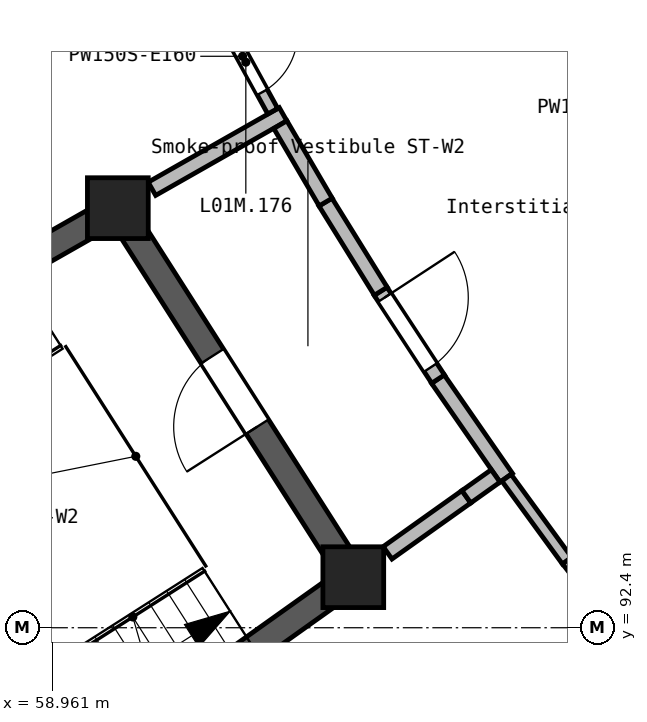
"""IFC4 building model, lengths in metres.
Left out: names, types, materials, properties, quantities, classifications, styles, units other than length and angle.
Written with IfcOpenShell. Run it as: python <this file> out.ifc"""

import sys

from ifc_helpers import new_model, si_unit, direction, frame, frame_2d, origin, origin_2d, place, context, subcontext, project, spatial, rectangle, extrude, element, fill, save


model = new_model("IFC4")
c1 = context("Model", 3, precision=1e-05, world=origin(), true_north=direction((0.0, 1.0)))
c2 = subcontext(c1, "Body", "Model", "MODEL_VIEW")
j1 = project(units=[si_unit("LENGTHUNIT", "METRE"), si_unit("PLANEANGLEUNIT", "RADIAN")], contexts=[c1])
p1 = place(None, origin())
s1 = spatial("IfcSite", under=j1, at=p1, CompositionType="ELEMENT")
p2 = place(p1, origin())
s2 = spatial("IfcBuilding", under=s1, at=p2, CompositionType="ELEMENT")
p3 = place(p2, frame((0.0, 0.0, 9.9)))
s3 = spatial("IfcBuildingStorey", under=s2, at=p3, CompositionType="ELEMENT", Elevation=9.9)
for number, where, z_axis, x_axis in (
    (1, (59.826, 97.92, 0.0), (0.0, 0.0, 1.0), (1.0, 0.0, 0.0)),
    (2, (62.924, 93.065, 0.0), (0.0, 0.0, 1.0), (1.0, 0.0, 0.0)),
):
    element("IfcColumn", number, at=place(p3, frame(where, z_axis=z_axis, x_axis=x_axis)), inside=s3, PredefinedType="COLUMN", context=c2, shape_type="SweptSolid", body=[
        extrude(rectangle(XDim=0.8, YDim=0.8, at=origin_2d()), origin(), (0.0, 0.0, 1.0), 2.7),
    ])
p4 = place(p3, frame((53.416, 94.274, 0.0), z_axis=(0.0, 0.0, 1.0), x_axis=(0.869250335475, 0.494372181941, 0.0)))
e3 = element("IfcWall", 3, at=p4, inside=s3, PredefinedType="SHEAR", context=c2, shape_type="SweptSolid", body=[
    extrude(rectangle(XDim=7.549, YDim=0.35, at=frame_2d((3.775, 0.0))), origin(), (0.0, 0.0, 1.0), 2.7),
])
p5 = place(p3, frame((56.916, 88.789, 0.0), z_axis=(0.0, 0.0, 1.0), x_axis=(0.814717690591, 0.579857814157, 0.0)))
e4 = element("IfcWall", 4, at=p5, inside=s3, PredefinedType="SHEAR", context=c2, shape_type="SweptSolid", body=[
    extrude(rectangle(XDim=7.55, YDim=0.35, at=frame_2d((3.775, 0.0))), origin(), (0.0, 0.0, 1.0), 2.7),
])
p6 = place(p3, frame((62.83, 93.212, 0.0), z_axis=(0.0, 0.0, 1.0), x_axis=(-0.537903079352, 0.843006688718, 0.0)))
e5 = element("IfcWall", 5, at=p6, inside=s3, PredefinedType="SHEAR", context=c2, shape_type="SweptSolid", body=[
    extrude(rectangle(XDim=5.409, YDim=0.35, at=frame_2d((2.705, 0.0))), origin(), (0.0, 0.0, 1.0), 2.7),
])
p7 = place(p6, frame((2.174, 0.0, 0.0)))
e6 = element("IfcOpeningElement", 6, at=p7, cuts=e5, PredefinedType="OPENING", context=c2, shape_type="SweptSolid", body=[
    extrude(rectangle(XDim=1.1, YDim=2.1, at=frame_2d((0.55, 1.05))), frame((0.0, 0.185, 0.0), z_axis=(0.0, -1.0, 0.0), x_axis=(1.0, 0.0, 0.0)), (0.0, 0.0, 1.0), 0.37),
])
p8 = place(p3, frame((64.412, 94.123, 0.0), z_axis=(0.0, 0.0, 1.0), x_axis=(-0.814782127128, -0.579767268232, 0.0)))
e7 = element("IfcWall", 7, at=p8, inside=s3, PredefinedType="SOLIDWALL", context=c2, shape_type="SweptSolid", body=[
    extrude(rectangle(XDim=1.272, YDim=0.2, at=frame_2d((0.636, 0.0))), origin(), (0.0, 0.0, 1.0), 2.45),
])
p9 = place(p3, frame((60.274, 98.175, 0.0), z_axis=(0.0, 0.0, 1.0), x_axis=(0.869398915424, 0.494110843698, 0.0)))
e8 = element("IfcWall", 8, at=p9, inside=s3, PredefinedType="SOLIDWALL", context=c2, shape_type="SweptSolid", body=[
    extrude(rectangle(XDim=1.985, YDim=0.2, at=frame_2d((0.992, 0.0))), origin(), (0.0, 0.0, 1.0), 2.45),
])
p10 = place(p3, frame((64.036, 95.672, 0.0), z_axis=(0.0, 0.0, 1.0), x_axis=(0.569764314915, -0.821808143942, 0.0)))
e9 = element("IfcWall", 9, at=p10, inside=s3, PredefinedType="SOLIDWALL", context=c2, shape_type="SweptSolid", body=[
    extrude(rectangle(XDim=1.58, YDim=0.2, at=frame_2d((0.79, 0.0))), origin(), (0.0, 0.0, 1.0), 2.45),
])
p11 = place(p3, frame((63.282, 96.828, 0.0), z_axis=(0.0, 0.0, 1.0), x_axis=(0.54791545279, -0.836533715156, 0.0)))
e10 = element("IfcWall", 10, at=p11, inside=s3, PredefinedType="SOLIDWALL", context=c2, shape_type="SweptSolid", body=[
    extrude(rectangle(XDim=1.382, YDim=0.2, at=frame_2d((0.691, 0.0))), origin(), (0.0, 0.0, 1.0), 2.45),
])
p12 = place(p11, frame((0.1, 0.0, 0.0)))
e11 = element("IfcOpeningElement", 11, at=p12, cuts=e10, PredefinedType="OPENING", context=c2, shape_type="SweptSolid", body=[
    extrude(rectangle(XDim=1.1, YDim=2.1, at=frame_2d((0.55, 1.05))), frame((0.0, 0.11, 0.0), z_axis=(0.0, -1.0, 0.0), x_axis=(1.0, 0.0, 0.0)), (0.0, 0.0, 1.0), 0.22),
])
p13 = place(p3, frame((62.557, 98.001, 0.0), z_axis=(0.0, 0.0, 1.0), x_axis=(0.526993282669, -0.849869448811, 0.0)))
e12 = element("IfcWall", 12, at=p13, inside=s3, PredefinedType="SOLIDWALL", context=c2, shape_type="SweptSolid", body=[
    extrude(rectangle(XDim=1.382, YDim=0.2, at=frame_2d((0.691, 0.0))), origin(), (0.0, 0.0, 1.0), 2.45),
])
p14 = place(p3, frame((61.964, 99.019, 0.0), z_axis=(0.0, 0.0, 1.0), x_axis=(0.505554921375, -0.862794425963, 0.0)))
e13 = element("IfcWall", 13, at=p14, inside=s3, PredefinedType="SOLIDWALL", context=c2, shape_type="SweptSolid", body=[
    extrude(rectangle(XDim=1.18, YDim=0.2, at=frame_2d((0.59, 0.0))), origin(), (0.0, 0.0, 1.0), 2.45),
])
p15 = place(p3, frame((64.412, 94.123, 0.0), z_axis=(0.0, 0.0, 1.0), x_axis=(0.814396335107, 0.580309063658, 0.0)))
e14 = element("IfcWall", 14, at=p15, inside=s3, PredefinedType="SOLIDWALL", context=c2, shape_type="SweptSolid", body=[
    extrude(rectangle(XDim=0.472, YDim=0.2, at=frame_2d((0.236, 0.0))), origin(), (0.0, 0.0, 1.0), 2.45),
])
p16 = place(p3, frame((61.071, 100.641, 0.0), z_axis=(0.0, 0.0, 1.0), x_axis=(0.481122709727, -0.876653259952, 0.0)))
e15 = element("IfcWall", 15, at=p16, inside=s3, PredefinedType="PARTITIONING", context=c2, shape_type="SweptSolid", body=[
    extrude(rectangle(XDim=1.649, YDim=0.15, at=frame_2d((0.824, 0.0))), origin(), (0.0, 0.0, 1.0), 2.45),
])
p17 = place(p16, frame((0.463, 0.0, 0.0)))
e16 = element("IfcOpeningElement", 16, at=p17, cuts=e15, PredefinedType="OPENING", context=c2, shape_type="SweptSolid", body=[
    extrude(rectangle(XDim=0.9, YDim=2.1, at=frame_2d((0.45, 1.05))), frame((0.0, 0.085, 0.0), z_axis=(0.0, -1.0, 0.0), x_axis=(1.0, 0.0, 0.0)), (0.0, 0.0, 1.0), 0.17),
])
p18 = place(p3, frame((64.939, 94.374, 0.0), z_axis=(0.0, 0.0, 1.0), x_axis=(0.589962289841, -0.807430799862, 0.0)))
e17 = element("IfcWall", 17, at=p18, inside=s3, PredefinedType="PARTITIONING", context=c2, shape_type="SweptSolid", body=[
    extrude(rectangle(XDim=1.353, YDim=0.15, at=frame_2d((0.676, 0.0))), origin(), (0.0, 0.0, 1.0), 2.45),
])
p19 = place(p3, frame((65.738, 93.284, 0.0), z_axis=(0.0, 0.0, 1.0), x_axis=(0.610437971513, -0.792064064919, 0.0)))
e18 = element("IfcWall", 18, at=p19, inside=s3, PredefinedType="PARTITIONING", context=c2, shape_type="SweptSolid", body=[
    extrude(rectangle(XDim=1.233, YDim=0.15, at=frame_2d((0.616, 0.0))), origin(), (0.0, 0.0, 1.0), 2.45),
])
p20 = place(p17, frame((0.9, 0.0, 0.0), z_axis=(0.0, 0.0, 1.0), x_axis=(-1.0, 0.0, 0.0)))
e19 = element("IfcDoor", 19, at=p20, inside=s3, OperationType="SINGLE_SWING_LEFT", PredefinedType="DOOR", context=c2, shape_type="SweptSolid", body=[
    extrude(rectangle(XDim=0.9, YDim=2.1, at=frame_2d((0.45, 1.05))), frame((0.0, 0.025, 0.0), z_axis=(0.0, -1.0, 0.0), x_axis=(1.0, 0.0, 0.0)), (0.0, 0.0, 1.0), 0.05),
])
fill(e16, e19)
p21 = place(p7, origin())
e20 = element("IfcDoor", 20, at=p21, inside=s3, OperationType="SINGLE_SWING_RIGHT", PredefinedType="DOOR", context=c2, shape_type="SweptSolid", body=[
    extrude(rectangle(XDim=1.1, YDim=2.1, at=frame_2d((0.55, 1.05))), frame((0.0, 0.025, 0.0), z_axis=(0.0, -1.0, 0.0), x_axis=(1.0, 0.0, 0.0)), (0.0, 0.0, 1.0), 0.05),
])
fill(e6, e20)
p22 = place(p12, frame((1.1, 0.0, 0.0), z_axis=(0.0, 0.0, 1.0), x_axis=(-1.0, 0.0, 0.0)))
e21 = element("IfcDoor", 21, at=p22, inside=s3, OperationType="SINGLE_SWING_RIGHT", PredefinedType="DOOR", context=c2, shape_type="SweptSolid", body=[
    extrude(rectangle(XDim=1.1, YDim=2.1, at=frame_2d((0.55, 1.05))), frame((0.0, 0.025, 0.0), z_axis=(0.0, -1.0, 0.0), x_axis=(1.0, 0.0, 0.0)), (0.0, 0.0, 1.0), 0.05),
])
fill(e11, e21)
save(model, sys.argv[1])
